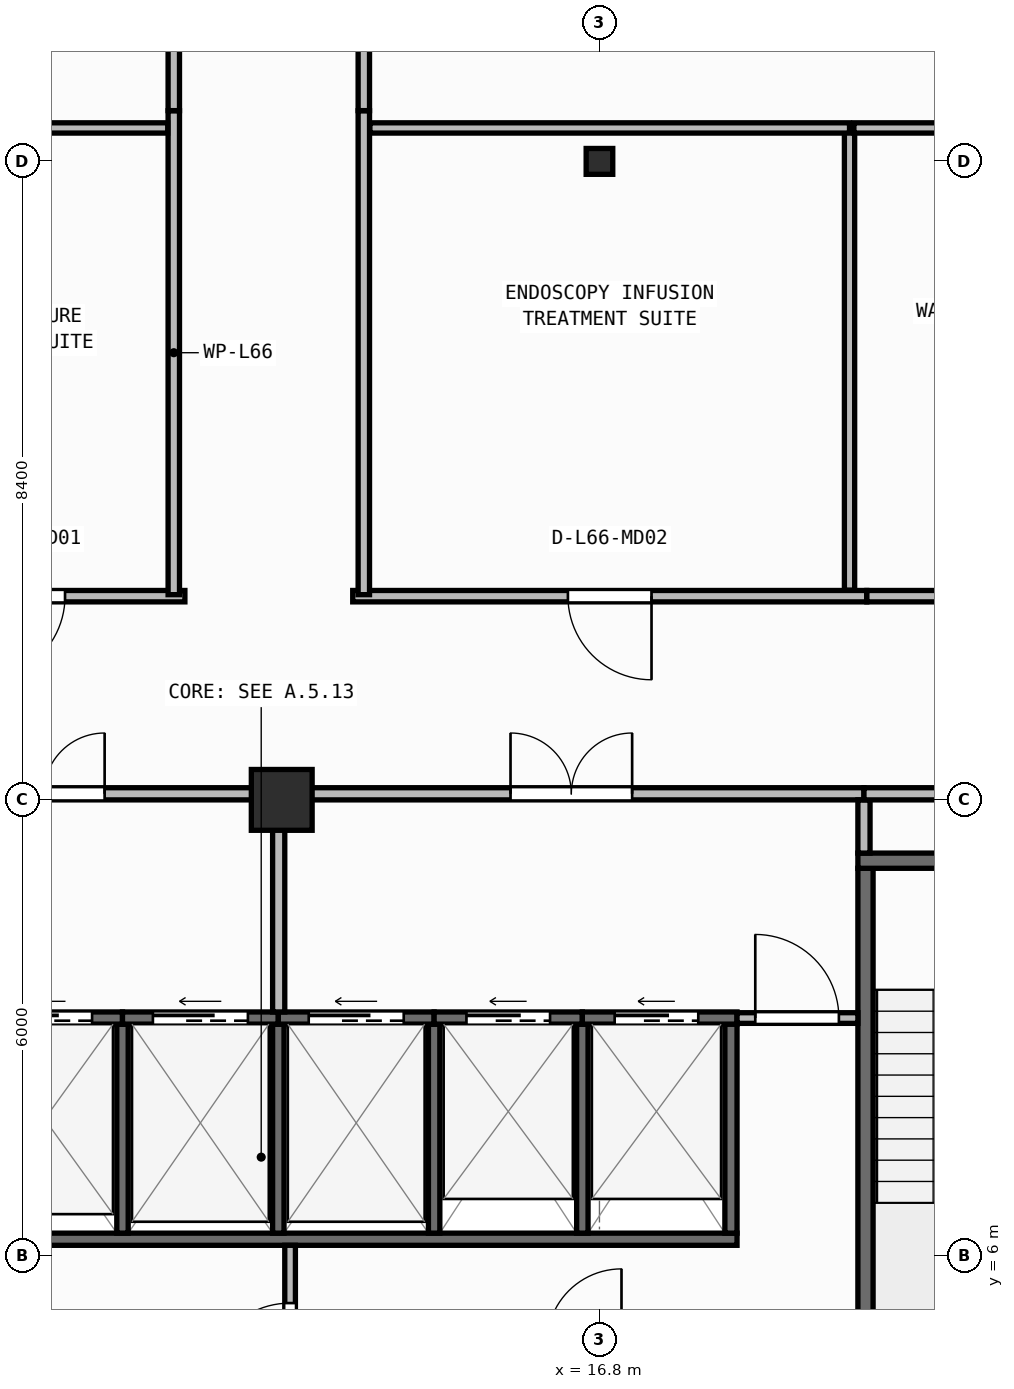
"""IFC4 building model, lengths in metres.
Left out: names, types, materials, properties, quantities, classifications, styles, units other than length and angle.
Written with IfcOpenShell. Run it as: python <this file> out.ifc"""

import sys

from ifc_helpers import new_model, si_unit, direction, frame, frame_2d, origin, origin_2d, place, context, subcontext, project, spatial, rectangle, i_section, extrude, element, fill, save


model = new_model("IFC4")
c1 = context("Model", 3, precision=1e-05, world=origin(), true_north=direction((0.0, 1.0)))
c2 = subcontext(c1, "Body", "Model", "MODEL_VIEW")
j1 = project(units=[si_unit("LENGTHUNIT", "METRE"), si_unit("PLANEANGLEUNIT", "RADIAN")], contexts=[c1])
p1 = place(None, origin())
s1 = spatial("IfcSite", under=j1, at=p1, CompositionType="ELEMENT")
p2 = place(p1, origin())
s2 = spatial("IfcBuilding", under=s1, at=p2, CompositionType="ELEMENT")
p3 = place(p2, frame((0.0, 0.0, 268.4)))
s3 = spatial("IfcBuildingStorey", under=s2, at=p3, CompositionType="ELEMENT", Elevation=268.4)
p4 = place(p3, frame((12.62, 12.0, 0.0), z_axis=(0.0, 0.0, 1.0), x_axis=(1.0, 0.0, 0.0)))
e1 = element("IfcColumn", 1, at=p4, inside=s3, PredefinedType="COLUMN", context=c2, shape_type="SweptSolid", body=[
    extrude(rectangle(XDim=0.8, YDim=0.8, at=origin_2d()), origin(), (0.0, 0.0, 1.0), 3.95),
])
p5 = place(p3, frame((16.8, 20.4, 0.0), z_axis=(0.0, 0.0, 1.0), x_axis=(1.0, 0.0, 0.0)))
e2 = element("IfcColumn", 2, at=p5, inside=s3, PredefinedType="COLUMN", context=c2, shape_type="SweptSolid", body=[
    extrude(i_section(OverallWidth=0.35, OverallDepth=0.34, WebThickness=0.016, FlangeThickness=0.028, at=origin_2d()), origin(), (0.0, 0.0, 1.0), 3.95),
])
p6 = place(p3, frame((20.3, 3.5, 0.0), z_axis=(0.0, 0.0, 1.0), x_axis=(0.0, 1.0, 0.0)))
e3 = element("IfcWall", 3, at=p6, inside=s3, PredefinedType="SHEAR", context=c2, shape_type="SweptSolid", body=[
    extrude(rectangle(XDim=7.6, YDim=0.2, at=frame_2d((3.8, 0.0))), origin(), (0.0, 0.0, 1.0), 3.71),
])
p7 = place(p3, frame((20.2, 11.2, 0.0), z_axis=(0.0, 0.0, 1.0), x_axis=(1.0, 0.0, 0.0)))
e4 = element("IfcWall", 4, at=p7, inside=s3, PredefinedType="SHEAR", context=c2, shape_type="SweptSolid", body=[
    extrude(rectangle(XDim=3.7, YDim=0.2, at=frame_2d((1.85, 0.0))), origin(), (0.0, 0.0, 1.0), 3.71),
])
p8 = place(p7, frame((1.2, 0.0, 0.0)))
e5 = element("IfcOpeningElement", 5, at=p8, cuts=e4, PredefinedType="OPENING", context=c2, shape_type="SweptSolid", body=[
    extrude(rectangle(XDim=1.3, YDim=2.15, at=frame_2d((0.65, 1.075))), frame((0.0, 0.11, 0.0), z_axis=(0.0, -1.0, 0.0), x_axis=(1.0, 0.0, 0.0)), (0.0, 0.0, 1.0), 0.22),
])
p9 = place(p3, frame((6.5, 6.22, 0.0), z_axis=(0.0, 0.0, 1.0), x_axis=(1.0, 0.0, 0.0)))
e6 = element("IfcWall", 6, at=p9, inside=s3, PredefinedType="SHEAR", context=c2, shape_type="SweptSolid", body=[
    extrude(rectangle(XDim=12.11, YDim=0.16, at=frame_2d((6.055, 0.0))), origin(), (0.0, 0.0, 1.0), 3.71),
])
p10 = place(p3, frame((18.53, 6.3, 0.0), z_axis=(0.0, 0.0, 1.0), x_axis=(0.0, 1.0, 0.0)))
e7 = element("IfcWall", 7, at=p10, inside=s3, PredefinedType="SHEAR", context=c2, shape_type="SweptSolid", body=[
    extrude(rectangle(XDim=2.75, YDim=0.16, at=frame_2d((1.375, 0.0))), origin(), (0.0, 0.0, 1.0), 3.71),
])
for number, where, z_axis, x_axis in (
    (8, (10.525, 6.3, 0.0), (0.0, 0.0, 1.0), (0.0, 1.0, 0.0)),
    (9, (12.575, 6.3, 0.0), (0.0, 0.0, 1.0), (0.0, 1.0, 0.0)),
    (10, (14.625, 6.3, 0.0), (0.0, 0.0, 1.0), (0.0, 1.0, 0.0)),
    (11, (16.575, 6.3, 0.0), (0.0, 0.0, 1.0), (0.0, 1.0, 0.0)),
):
    element("IfcWall", number, at=place(p3, frame(where, z_axis=z_axis, x_axis=x_axis)), inside=s3, PredefinedType="SHEAR", context=c2, shape_type="SweptSolid", body=[
        extrude(rectangle(XDim=2.75, YDim=0.15, at=frame_2d((1.375, 0.0))), origin(), (0.0, 0.0, 1.0), 3.71),
    ])
p11 = place(p3, frame((8.475, 9.13, 0.0), z_axis=(0.0, 0.0, 1.0), x_axis=(1.0, 0.0, 0.0)))
e12 = element("IfcWall", 12, at=p11, inside=s3, PredefinedType="SHEAR", context=c2, shape_type="SweptSolid", body=[
    extrude(rectangle(XDim=2.05, YDim=0.16, at=frame_2d((1.025, 0.0))), origin(), (0.0, 0.0, 1.0), 3.71),
])
p12 = place(p11, frame((0.4, 0.0, 0.0)))
e13 = element("IfcOpeningElement", 13, at=p12, cuts=e12, PredefinedType="OPENING", context=c2, shape_type="SweptSolid", body=[
    extrude(rectangle(XDim=1.25, YDim=2.15, at=frame_2d((0.625, 1.075))), frame((0.0, 0.09, 0.0), z_axis=(0.0, -1.0, 0.0), x_axis=(1.0, 0.0, 0.0)), (0.0, 0.0, 1.0), 0.18),
])
p13 = place(p3, frame((10.525, 9.13, 0.0), z_axis=(0.0, 0.0, 1.0), x_axis=(1.0, 0.0, 0.0)))
e14 = element("IfcWall", 14, at=p13, inside=s3, PredefinedType="SHEAR", context=c2, shape_type="SweptSolid", body=[
    extrude(rectangle(XDim=2.05, YDim=0.16, at=frame_2d((1.025, 0.0))), origin(), (0.0, 0.0, 1.0), 3.71),
])
p14 = place(p13, frame((0.4, 0.0, 0.0)))
e15 = element("IfcOpeningElement", 15, at=p14, cuts=e14, PredefinedType="OPENING", context=c2, shape_type="SweptSolid", body=[
    extrude(rectangle(XDim=1.25, YDim=2.15, at=frame_2d((0.625, 1.075))), frame((0.0, 0.09, 0.0), z_axis=(0.0, -1.0, 0.0), x_axis=(1.0, 0.0, 0.0)), (0.0, 0.0, 1.0), 0.18),
])
p15 = place(p3, frame((12.575, 9.13, 0.0), z_axis=(0.0, 0.0, 1.0), x_axis=(1.0, 0.0, 0.0)))
e16 = element("IfcWall", 16, at=p15, inside=s3, PredefinedType="SHEAR", context=c2, shape_type="SweptSolid", body=[
    extrude(rectangle(XDim=2.05, YDim=0.16, at=frame_2d((1.025, 0.0))), origin(), (0.0, 0.0, 1.0), 3.71),
])
p16 = place(p15, frame((0.4, 0.0, 0.0)))
e17 = element("IfcOpeningElement", 17, at=p16, cuts=e16, PredefinedType="OPENING", context=c2, shape_type="SweptSolid", body=[
    extrude(rectangle(XDim=1.25, YDim=2.15, at=frame_2d((0.625, 1.075))), frame((0.0, 0.09, 0.0), z_axis=(0.0, -1.0, 0.0), x_axis=(1.0, 0.0, 0.0)), (0.0, 0.0, 1.0), 0.18),
])
p17 = place(p3, frame((14.625, 9.13, 0.0), z_axis=(0.0, 0.0, 1.0), x_axis=(1.0, 0.0, 0.0)))
e18 = element("IfcWall", 18, at=p17, inside=s3, PredefinedType="SHEAR", context=c2, shape_type="SweptSolid", body=[
    extrude(rectangle(XDim=1.95, YDim=0.16, at=frame_2d((0.975, 0.0))), origin(), (0.0, 0.0, 1.0), 3.71),
])
p18 = place(p17, frame((0.425, 0.0, 0.0)))
e19 = element("IfcOpeningElement", 19, at=p18, cuts=e18, PredefinedType="OPENING", context=c2, shape_type="SweptSolid", body=[
    extrude(rectangle(XDim=1.1, YDim=2.15, at=frame_2d((0.55, 1.075))), frame((0.0, 0.09, 0.0), z_axis=(0.0, -1.0, 0.0), x_axis=(1.0, 0.0, 0.0)), (0.0, 0.0, 1.0), 0.18),
])
p19 = place(p3, frame((16.575, 9.13, 0.0), z_axis=(0.0, 0.0, 1.0), x_axis=(1.0, 0.0, 0.0)))
e20 = element("IfcWall", 20, at=p19, inside=s3, PredefinedType="SHEAR", context=c2, shape_type="SweptSolid", body=[
    extrude(rectangle(XDim=2.035, YDim=0.16, at=frame_2d((1.018, 0.0))), origin(), (0.0, 0.0, 1.0), 3.71),
])
p20 = place(p19, frame((0.425, 0.0, 0.0)))
e21 = element("IfcOpeningElement", 21, at=p20, cuts=e20, PredefinedType="OPENING", context=c2, shape_type="SweptSolid", body=[
    extrude(rectangle(XDim=1.1, YDim=2.15, at=frame_2d((0.55, 1.075))), frame((0.0, 0.09, 0.0), z_axis=(0.0, -1.0, 0.0), x_axis=(1.0, 0.0, 0.0)), (0.0, 0.0, 1.0), 0.18),
])
p21 = place(p3, frame((12.73, 3.52, 0.0), z_axis=(0.0, 0.0, 1.0), x_axis=(0.0, 1.0, 0.0)))
e22 = element("IfcWall", 22, at=p21, inside=s3, PredefinedType="PARTITIONING", context=c2, shape_type="SweptSolid", body=[
    extrude(rectangle(XDim=2.62, YDim=0.14, at=frame_2d((1.31, 0.0))), origin(), (0.0, 0.0, 1.0), 3.71),
])
p22 = place(p21, frame((0.76, 0.0, 0.0)))
e23 = element("IfcOpeningElement", 23, at=p22, cuts=e22, PredefinedType="OPENING", context=c2, shape_type="SweptSolid", body=[
    extrude(rectangle(XDim=1.1, YDim=2.1, at=frame_2d((0.55, 1.05))), frame((0.0, 0.08, 0.0), z_axis=(0.0, -1.0, 0.0), x_axis=(1.0, 0.0, 0.0)), (0.0, 0.0, 1.0), 0.16),
])
p23 = place(p3, frame((18.61, 9.13, 0.0), z_axis=(0.0, 0.0, 1.0), x_axis=(1.0, 0.0, 0.0)))
e24 = element("IfcWall", 24, at=p23, inside=s3, PredefinedType="PARTITIONING", context=c2, shape_type="SweptSolid", body=[
    extrude(rectangle(XDim=1.59, YDim=0.14, at=frame_2d((0.795, 0.0))), origin(), (0.0, 0.0, 1.0), 3.71),
])
p24 = place(p23, frame((0.24, 0.0, 0.0)))
e25 = element("IfcOpeningElement", 25, at=p24, cuts=e24, PredefinedType="OPENING", context=c2, shape_type="SweptSolid", body=[
    extrude(rectangle(XDim=1.1, YDim=2.1, at=frame_2d((0.55, 1.05))), frame((0.0, 0.08, 0.0), z_axis=(0.0, -1.0, 0.0), x_axis=(1.0, 0.0, 0.0)), (0.0, 0.0, 1.0), 0.16),
])
p25 = place(p3, frame((6.4, 12.08, 0.0), z_axis=(0.0, 0.0, 1.0), x_axis=(1.0, 0.0, 0.0)))
e26 = element("IfcWall", 26, at=p25, inside=s3, PredefinedType="PARTITIONING", context=c2, shape_type="SweptSolid", body=[
    extrude(rectangle(XDim=6.18, YDim=0.16, at=frame_2d((3.09, 0.0))), origin(), (0.0, 0.0, 1.0), 3.157),
])
p26 = place(p25, frame((2.29, 0.0, 0.0)))
e27 = element("IfcOpeningElement", 27, at=p26, cuts=e26, PredefinedType="OPENING", context=c2, shape_type="SweptSolid", body=[
    extrude(rectangle(XDim=1.6, YDim=2.05, at=frame_2d((0.8, 1.025))), frame((0.0, 0.09, 0.0), z_axis=(0.0, -1.0, 0.0), x_axis=(1.0, 0.0, 0.0)), (0.0, 0.0, 1.0), 0.18),
])
p27 = place(p3, frame((12.58, 9.21, 0.0), z_axis=(0.0, 0.0, 1.0), x_axis=(0.0, 1.0, 0.0)))
e28 = element("IfcWall", 28, at=p27, inside=s3, PredefinedType="PARTITIONING", context=c2, shape_type="SweptSolid", body=[
    extrude(rectangle(XDim=2.79, YDim=0.16, at=frame_2d((1.395, 0.0))), origin(), (0.0, 0.0, 1.0), 3.71),
])
p28 = place(p3, frame((12.58, 12.08, 0.0), z_axis=(0.0, 0.0, 1.0), x_axis=(1.0, 0.0, 0.0)))
e29 = element("IfcWall", 29, at=p28, inside=s3, PredefinedType="PARTITIONING", context=c2, shape_type="SweptSolid", body=[
    extrude(rectangle(XDim=7.7, YDim=0.16, at=frame_2d((3.85, 0.0))), origin(), (0.0, 0.0, 1.0), 3.157),
])
p29 = place(p28, frame((3.05, 0.0, 0.0)))
e30 = element("IfcOpeningElement", 30, at=p29, cuts=e29, PredefinedType="OPENING", context=c2, shape_type="SweptSolid", body=[
    extrude(rectangle(XDim=1.6, YDim=2.05, at=frame_2d((0.8, 1.025))), frame((0.0, 0.09, 0.0), z_axis=(0.0, -1.0, 0.0), x_axis=(1.0, 0.0, 0.0)), (0.0, 0.0, 1.0), 0.18),
])
p30 = place(p3, frame((20.28, 11.3, 0.0), z_axis=(0.0, 0.0, 1.0), x_axis=(0.0, 1.0, 0.0)))
e31 = element("IfcWall", 31, at=p30, inside=s3, PredefinedType="PARTITIONING", context=c2, shape_type="SweptSolid", body=[
    extrude(rectangle(XDim=0.7, YDim=0.16, at=frame_2d((0.35, 0.0))), origin(), (0.0, 0.0, 1.0), 3.71),
])
p31 = place(p3, frame((20.28, 12.08, 0.0), z_axis=(0.0, 0.0, 1.0), x_axis=(1.0, 0.0, 0.0)))
e32 = element("IfcWall", 32, at=p31, inside=s3, PredefinedType="PARTITIONING", context=c2, shape_type="SweptSolid", body=[
    extrude(rectangle(XDim=3.62, YDim=0.16, at=frame_2d((1.81, 0.0))), origin(), (0.0, 0.0, 1.0), 3.157),
])
p32 = place(p31, frame((1.01, 0.0, 0.0)))
e33 = element("IfcOpeningElement", 33, at=p32, cuts=e32, PredefinedType="OPENING", context=c2, shape_type="SweptSolid", body=[
    extrude(rectangle(XDim=1.6, YDim=2.05, at=frame_2d((0.8, 1.025))), frame((0.0, 0.09, 0.0), z_axis=(0.0, -1.0, 0.0), x_axis=(1.0, 0.0, 0.0)), (0.0, 0.0, 1.0), 0.18),
])
p33 = place(p3, frame((11.346, 14.68, 0.0), z_axis=(0.0, 0.0, 1.0), x_axis=(-1.0, 0.0, 0.0)))
e34 = element("IfcWall", 34, at=p33, inside=s3, PredefinedType="PARTITIONING", context=c2, shape_type="SweptSolid", body=[
    extrude(rectangle(XDim=4.254, YDim=0.15, at=frame_2d((2.127, 0.0))), origin(), (0.0, 0.0, 1.0), 3.71),
])
p34 = place(p33, frame((1.577, 0.0, 0.0)))
e35 = element("IfcOpeningElement", 35, at=p34, cuts=e34, PredefinedType="OPENING", context=c2, shape_type="SweptSolid", body=[
    extrude(rectangle(XDim=1.1, YDim=2.1, at=frame_2d((0.55, 1.05))), frame((0.0, 0.085, 0.0), z_axis=(0.0, -1.0, 0.0), x_axis=(1.0, 0.0, 0.0)), (0.0, 0.0, 1.0), 0.17),
])
p35 = place(p3, frame((20.316, 14.68, 0.0), z_axis=(0.0, 0.0, 1.0), x_axis=(-1.0, 0.0, 0.0)))
e36 = element("IfcWall", 36, at=p35, inside=s3, PredefinedType="PARTITIONING", context=c2, shape_type="SweptSolid", body=[
    extrude(rectangle(XDim=6.762, YDim=0.15, at=frame_2d((3.381, 0.0))), origin(), (0.0, 0.0, 1.0), 3.71),
])
p36 = place(p35, frame((2.831, 0.0, 0.0)))
e37 = element("IfcOpeningElement", 37, at=p36, cuts=e36, PredefinedType="OPENING", context=c2, shape_type="SweptSolid", body=[
    extrude(rectangle(XDim=1.1, YDim=2.1, at=frame_2d((0.55, 1.05))), frame((0.0, 0.085, 0.0), z_axis=(0.0, -1.0, 0.0), x_axis=(1.0, 0.0, 0.0)), (0.0, 0.0, 1.0), 0.17),
])
p37 = place(p3, frame((28.036, 14.68, 0.0), z_axis=(0.0, 0.0, 1.0), x_axis=(-1.0, 0.0, 0.0)))
e38 = element("IfcWall", 38, at=p37, inside=s3, PredefinedType="PARTITIONING", context=c2, shape_type="SweptSolid", body=[
    extrude(rectangle(XDim=7.718, YDim=0.15, at=frame_2d((3.859, 0.0))), origin(), (0.0, 0.0, 1.0), 3.71),
])
p38 = place(p37, frame((3.309, 0.0, 0.0)))
e39 = element("IfcOpeningElement", 39, at=p38, cuts=e38, PredefinedType="OPENING", context=c2, shape_type="SweptSolid", body=[
    extrude(rectangle(XDim=1.1, YDim=2.1, at=frame_2d((0.55, 1.05))), frame((0.0, 0.085, 0.0), z_axis=(0.0, -1.0, 0.0), x_axis=(1.0, 0.0, 0.0)), (0.0, 0.0, 1.0), 0.17),
])
for number, where, z_axis, x_axis in (
    (40, (11.2, 21.066, 0.0), (0.0, 0.0, 1.0), (0.0, -1.0, 0.0)),
    (41, (13.7, 14.7, 0.0), (0.0, 0.0, 1.0), (0.0, 1.0, 0.0)),
):
    element("IfcWall", number, at=place(p3, frame(where, z_axis=z_axis, x_axis=x_axis)), inside=s3, PredefinedType="PARTITIONING", context=c2, shape_type="SweptSolid", body=[
        extrude(rectangle(XDim=6.366, YDim=0.15, at=frame_2d((3.183, 0.0))), origin(), (0.0, 0.0, 1.0), 3.71),
    ])
p39 = place(p3, frame((11.2, 27.26, 0.0), z_axis=(0.0, 0.0, 1.0), x_axis=(0.0, -1.0, 0.0)))
e42 = element("IfcWall", 42, at=p39, inside=s3, PredefinedType="PARTITIONING", context=c2, shape_type="SweptSolid", body=[
    extrude(rectangle(XDim=6.192, YDim=0.15, at=frame_2d((3.096, 0.0))), origin(), (0.0, 0.0, 1.0), 3.71),
])
p40 = place(p39, frame((2.546, 0.0, 0.0)))
e43 = element("IfcOpeningElement", 43, at=p40, cuts=e42, PredefinedType="OPENING", context=c2, shape_type="SweptSolid", body=[
    extrude(rectangle(XDim=1.1, YDim=2.1, at=frame_2d((0.55, 1.05))), frame((0.0, 0.085, 0.0), z_axis=(0.0, -1.0, 0.0), x_axis=(1.0, 0.0, 0.0)), (0.0, 0.0, 1.0), 0.17),
])
p41 = place(p3, frame((13.7, 21.068, 0.0), z_axis=(0.0, 0.0, 1.0), x_axis=(0.0, 1.0, 0.0)))
e44 = element("IfcWall", 44, at=p41, inside=s3, PredefinedType="PARTITIONING", context=c2, shape_type="SweptSolid", body=[
    extrude(rectangle(XDim=6.192, YDim=0.15, at=frame_2d((3.096, 0.0))), origin(), (0.0, 0.0, 1.0), 3.71),
])
p42 = place(p41, frame((2.546, 0.0, 0.0)))
e45 = element("IfcOpeningElement", 45, at=p42, cuts=e44, PredefinedType="OPENING", context=c2, shape_type="SweptSolid", body=[
    extrude(rectangle(XDim=1.1, YDim=2.1, at=frame_2d((0.55, 1.05))), frame((0.0, 0.085, 0.0), z_axis=(0.0, -1.0, 0.0), x_axis=(1.0, 0.0, 0.0)), (0.0, 0.0, 1.0), 0.17),
])
p43 = place(p3, frame((11.12, 20.84, 0.0), z_axis=(0.0, 0.0, 1.0), x_axis=(-1.0, 0.0, 0.0)))
e46 = element("IfcWall", 46, at=p43, inside=s3, PredefinedType="PARTITIONING", context=c2, shape_type="SweptSolid", body=[
    extrude(rectangle(XDim=4.303, YDim=0.135, at=frame_2d((2.151, 0.0))), origin(), (0.0, 0.0, 1.0), 3.157),
])
p44 = place(p3, frame((20.09, 14.76, 0.0), z_axis=(0.0, 0.0, 1.0), x_axis=(0.0, 1.0, 0.0)))
e47 = element("IfcWall", 47, at=p44, inside=s3, PredefinedType="PARTITIONING", context=c2, shape_type="SweptSolid", body=[
    extrude(rectangle(XDim=6.08, YDim=0.135, at=frame_2d((3.04, 0.0))), origin(), (0.0, 0.0, 1.0), 3.71),
])
p45 = place(p3, frame((20.09, 20.84, 0.0), z_axis=(0.0, 0.0, 1.0), x_axis=(-1.0, 0.0, 0.0)))
e48 = element("IfcWall", 48, at=p45, inside=s3, PredefinedType="PARTITIONING", context=c2, shape_type="SweptSolid", body=[
    extrude(rectangle(XDim=6.31, YDim=0.135, at=frame_2d((3.155, 0.0))), origin(), (0.0, 0.0, 1.0), 3.157),
])
p46 = place(p3, frame((23.847, 20.84, 0.0), z_axis=(0.0, 0.0, 1.0), x_axis=(-1.0, 0.0, 0.0)))
e49 = element("IfcWall", 49, at=p46, inside=s3, PredefinedType="PARTITIONING", context=c2, shape_type="SweptSolid", body=[
    extrude(rectangle(XDim=3.7, YDim=0.135, at=frame_2d((1.85, 0.0))), origin(), (0.0, 0.0, 1.0), 3.157),
])
p47 = place(p12, origin())
e50 = element("IfcDoor", 50, at=p47, inside=s3, OperationType="SLIDING_TO_LEFT", PredefinedType="DOOR", context=c2, shape_type="SweptSolid", body=[
    extrude(rectangle(XDim=1.25, YDim=2.15, at=frame_2d((0.625, 1.075))), frame((0.0, 0.025, 0.0), z_axis=(0.0, -1.0, 0.0), x_axis=(1.0, 0.0, 0.0)), (0.0, 0.0, 1.0), 0.05),
])
fill(e13, e50)
p48 = place(p14, origin())
e51 = element("IfcDoor", 51, at=p48, inside=s3, OperationType="SLIDING_TO_LEFT", PredefinedType="DOOR", context=c2, shape_type="SweptSolid", body=[
    extrude(rectangle(XDim=1.25, YDim=2.15, at=frame_2d((0.625, 1.075))), frame((0.0, 0.025, 0.0), z_axis=(0.0, -1.0, 0.0), x_axis=(1.0, 0.0, 0.0)), (0.0, 0.0, 1.0), 0.05),
])
fill(e15, e51)
p49 = place(p16, origin())
e52 = element("IfcDoor", 52, at=p49, inside=s3, OperationType="SLIDING_TO_LEFT", PredefinedType="DOOR", context=c2, shape_type="SweptSolid", body=[
    extrude(rectangle(XDim=1.25, YDim=2.15, at=frame_2d((0.625, 1.075))), frame((0.0, 0.025, 0.0), z_axis=(0.0, -1.0, 0.0), x_axis=(1.0, 0.0, 0.0)), (0.0, 0.0, 1.0), 0.05),
])
fill(e17, e52)
p50 = place(p18, origin())
e53 = element("IfcDoor", 53, at=p50, inside=s3, OperationType="SLIDING_TO_LEFT", PredefinedType="DOOR", context=c2, shape_type="SweptSolid", body=[
    extrude(rectangle(XDim=1.1, YDim=2.15, at=frame_2d((0.55, 1.075))), frame((0.0, 0.025, 0.0), z_axis=(0.0, -1.0, 0.0), x_axis=(1.0, 0.0, 0.0)), (0.0, 0.0, 1.0), 0.05),
])
fill(e19, e53)
p51 = place(p20, origin())
e54 = element("IfcDoor", 54, at=p51, inside=s3, OperationType="SLIDING_TO_LEFT", PredefinedType="DOOR", context=c2, shape_type="SweptSolid", body=[
    extrude(rectangle(XDim=1.1, YDim=2.15, at=frame_2d((0.55, 1.075))), frame((0.0, 0.025, 0.0), z_axis=(0.0, -1.0, 0.0), x_axis=(1.0, 0.0, 0.0)), (0.0, 0.0, 1.0), 0.05),
])
fill(e21, e54)
p52 = place(p22, origin())
e55 = element("IfcDoor", 55, at=p52, inside=s3, OperationType="SINGLE_SWING_LEFT", PredefinedType="DOOR", context=c2, shape_type="SweptSolid", body=[
    extrude(rectangle(XDim=1.1, YDim=2.1, at=frame_2d((0.55, 1.05))), frame((0.0, 0.025, 0.0), z_axis=(0.0, -1.0, 0.0), x_axis=(1.0, 0.0, 0.0)), (0.0, 0.0, 1.0), 0.05),
])
fill(e23, e55)
p53 = place(p24, origin())
e56 = element("IfcDoor", 56, at=p53, inside=s3, OperationType="SINGLE_SWING_LEFT", PredefinedType="DOOR", context=c2, shape_type="SweptSolid", body=[
    extrude(rectangle(XDim=1.1, YDim=2.1, at=frame_2d((0.55, 1.05))), frame((0.0, 0.025, 0.0), z_axis=(0.0, -1.0, 0.0), x_axis=(1.0, 0.0, 0.0)), (0.0, 0.0, 1.0), 0.05),
])
fill(e25, e56)
p54 = place(p26, origin())
e57 = element("IfcDoor", 57, at=p54, inside=s3, OperationType="DOUBLE_DOOR_SINGLE_SWING", PredefinedType="DOOR", context=c2, shape_type="SweptSolid", body=[
    extrude(rectangle(XDim=1.6, YDim=2.05, at=frame_2d((0.8, 1.025))), frame((0.0, 0.025, 0.0), z_axis=(0.0, -1.0, 0.0), x_axis=(1.0, 0.0, 0.0)), (0.0, 0.0, 1.0), 0.05),
])
fill(e27, e57)
p55 = place(p29, origin())
e58 = element("IfcDoor", 58, at=p55, inside=s3, OperationType="DOUBLE_DOOR_SINGLE_SWING", PredefinedType="DOOR", context=c2, shape_type="SweptSolid", body=[
    extrude(rectangle(XDim=1.6, YDim=2.05, at=frame_2d((0.8, 1.025))), frame((0.0, 0.025, 0.0), z_axis=(0.0, -1.0, 0.0), x_axis=(1.0, 0.0, 0.0)), (0.0, 0.0, 1.0), 0.05),
])
fill(e30, e58)
p56 = place(p34, origin())
e59 = element("IfcDoor", 59, at=p56, inside=s3, OperationType="SINGLE_SWING_RIGHT", PredefinedType="DOOR", context=c2, shape_type="SweptSolid", body=[
    extrude(rectangle(XDim=1.1, YDim=2.1, at=frame_2d((0.55, 1.05))), frame((0.0, 0.025, 0.0), z_axis=(0.0, -1.0, 0.0), x_axis=(1.0, 0.0, 0.0)), (0.0, 0.0, 1.0), 0.05),
])
fill(e35, e59)
p57 = place(p36, origin())
e60 = element("IfcDoor", 60, at=p57, inside=s3, OperationType="SINGLE_SWING_LEFT", PredefinedType="DOOR", context=c2, shape_type="SweptSolid", body=[
    extrude(rectangle(XDim=1.1, YDim=2.1, at=frame_2d((0.55, 1.05))), frame((0.0, 0.025, 0.0), z_axis=(0.0, -1.0, 0.0), x_axis=(1.0, 0.0, 0.0)), (0.0, 0.0, 1.0), 0.05),
])
fill(e37, e60)
save(model, sys.argv[1])
